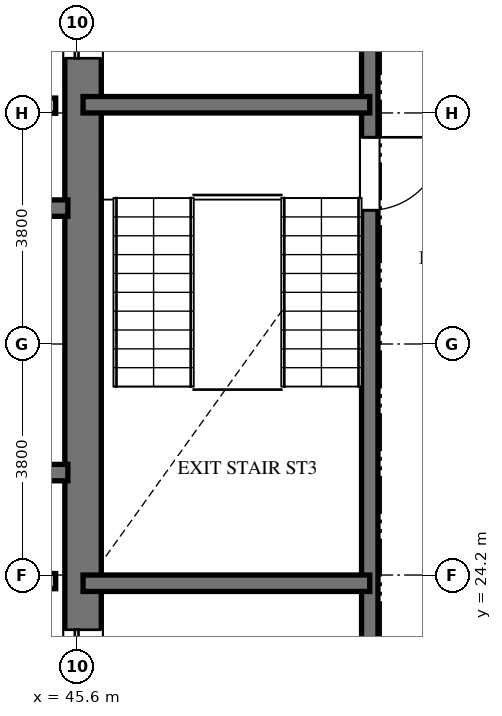
"""IFC4 building model, lengths in metres.
Left out: names, types, materials, properties, quantities, classifications, styles, units other than length and angle.
Written with IfcOpenShell. Run it as: python <this file> out.ifc"""

import sys

from ifc_helpers import new_model, si_unit, direction, frame, frame_2d, origin, place, context, subcontext, project, spatial, rectangle, extrude, element, fill, save


model = new_model("IFC4")
c1 = context("Model", 3, precision=1e-05, world=origin(), true_north=direction((0.0, 1.0)))
c2 = subcontext(c1, "Body", "Model", "MODEL_VIEW")
j1 = project(units=[si_unit("LENGTHUNIT", "METRE"), si_unit("PLANEANGLEUNIT", "RADIAN")], contexts=[c1])
p1 = place(None, origin())
s1 = spatial("IfcSite", under=j1, at=p1, CompositionType="ELEMENT")
p2 = place(p1, origin())
s2 = spatial("IfcBuilding", under=s1, at=p2, CompositionType="ELEMENT")
p3 = place(p2, frame((0.0, 0.0, 178.416)))
s3 = spatial("IfcBuildingStorey", under=s2, at=p3, CompositionType="ELEMENT", Elevation=178.416)
p4 = place(p3, frame((45.7, 20.95, 0.0), z_axis=(0.0, 0.0, 1.0), x_axis=(0.0, 1.0, 0.0)))
e1 = element("IfcWall", 1, at=p4, inside=s3, PredefinedType="SHEAR", context=c2, shape_type="SweptSolid", body=[
    extrude(rectangle(XDim=14.1, YDim=0.6, at=frame_2d((7.05, 0.0))), origin(), (0.0, 0.0, 1.0), 3.648),
])
p5 = place(p4, frame((11.75, 0.0, 0.0)))
e2 = element("IfcOpeningElement", 2, at=p5, cuts=e1, PredefinedType="OPENING", context=c2, shape_type="SweptSolid", body=[
    extrude(rectangle(XDim=1.4, YDim=2.3, at=frame_2d((0.7, 1.15))), frame((0.0, 0.31, 0.0), z_axis=(0.0, -1.0, 0.0), x_axis=(1.0, 0.0, 0.0)), (0.0, 0.0, 1.0), 0.62),
])
p6 = place(p4, frame((0.95, 0.0, 0.0)))
e3 = element("IfcOpeningElement", 3, at=p6, cuts=e1, PredefinedType="OPENING", context=c2, shape_type="SweptSolid", body=[
    extrude(rectangle(XDim=1.4, YDim=2.3, at=frame_2d((0.7, 1.15))), frame((0.0, 0.31, 0.0), z_axis=(0.0, -1.0, 0.0), x_axis=(1.0, 0.0, 0.0)), (0.0, 0.0, 1.0), 0.62),
])
p7 = place(p3, frame((37.465, 30.235, 0.0), z_axis=(0.0, 0.0, 1.0), x_axis=(1.0, 0.0, 0.0)))
e4 = element("IfcWall", 4, at=p7, inside=s3, PredefinedType="SHEAR", context=c2, shape_type="SweptSolid", body=[
    extrude(rectangle(XDim=7.985, YDim=0.27, at=frame_2d((3.992, 0.0))), origin(), (0.0, 0.0, 1.0), 3.648),
])
p8 = place(p7, frame((6.455, 0.0, 0.0)))
e5 = element("IfcOpeningElement", 5, at=p8, cuts=e4, PredefinedType="OPENING", context=c2, shape_type="SweptSolid", body=[
    extrude(rectangle(XDim=1.2, YDim=2.15, at=frame_2d((0.6, 1.075))), frame((0.0, 0.145, 0.0), z_axis=(0.0, -1.0, 0.0), x_axis=(1.0, 0.0, 0.0)), (0.0, 0.0, 1.0), 0.29),
])
p9 = place(p3, frame((37.465, 25.885, 0.0), z_axis=(0.0, 0.0, 1.0), x_axis=(1.0, 0.0, 0.0)))
e6 = element("IfcWall", 6, at=p9, inside=s3, PredefinedType="SHEAR", context=c2, shape_type="SweptSolid", body=[
    extrude(rectangle(XDim=7.985, YDim=0.27, at=frame_2d((3.992, 0.0))), origin(), (0.0, 0.0, 1.0), 3.648),
])
for number, where, z_axis, x_axis in (
    (7, (42.95, 31.92, 0.0), (0.0, 0.0, 1.0), (1.0, 0.0, 0.0)),
    (8, (42.95, 24.1, 0.0), (0.0, 0.0, 1.0), (1.0, 0.0, 0.0)),
):
    element("IfcWall", number, at=place(p3, frame(where, z_axis=z_axis, x_axis=x_axis)), inside=s3, PredefinedType="SOLIDWALL", context=c2, shape_type="SweptSolid", body=[
        extrude(rectangle(XDim=2.3, YDim=0.25, at=frame_2d((1.15, 0.0))), origin(), (0.0, 0.0, 1.0), 3.428),
    ])
p10 = place(p3, frame((50.415, 35.845, 0.0), z_axis=(0.0, 0.0, 1.0), x_axis=(0.0, -1.0, 0.0)))
e9 = element("IfcWall", 9, at=p10, inside=s3, PredefinedType="SHEAR", context=c2, shape_type="SweptSolid", body=[
    extrude(rectangle(XDim=15.825, YDim=0.27, at=frame_2d((7.913, 0.0))), origin(), (0.0, 0.0, 1.0), 3.648),
])
p11 = place(p10, frame((4.445, 0.0, 0.0)))
e10 = element("IfcOpeningElement", 10, at=p11, cuts=e9, PredefinedType="OPENING", context=c2, shape_type="SweptSolid", body=[
    extrude(rectangle(XDim=1.2, YDim=2.15, at=frame_2d((0.6, 1.075))), frame((0.0, 0.145, 0.0), z_axis=(0.0, -1.0, 0.0), x_axis=(1.0, 0.0, 0.0)), (0.0, 0.0, 1.0), 0.29),
])
p12 = place(p10, frame((1.295, 0.0, 0.0)))
e11 = element("IfcOpeningElement", 11, at=p12, cuts=e9, PredefinedType="OPENING", context=c2, shape_type="SweptSolid", body=[
    extrude(rectangle(XDim=1.3, YDim=2.2, at=frame_2d((0.65, 1.1))), frame((0.0, 0.145, 0.0), z_axis=(0.0, -1.0, 0.0), x_axis=(1.0, 0.0, 0.0)), (0.0, 0.0, 1.0), 0.29),
])
p13 = place(p10, frame((13.095, 0.0, 0.0)))
e12 = element("IfcOpeningElement", 12, at=p13, cuts=e9, PredefinedType="OPENING", context=c2, shape_type="SweptSolid", body=[
    extrude(rectangle(XDim=1.3, YDim=2.2, at=frame_2d((0.65, 1.1))), frame((0.0, 0.145, 0.0), z_axis=(0.0, -1.0, 0.0), x_axis=(1.0, 0.0, 0.0)), (0.0, 0.0, 1.0), 0.29),
])
for number, where, z_axis, x_axis in (
    (13, (45.7, 31.935, 0.0), (0.0, 0.0, 1.0), (1.0, 0.0, 0.0)),
    (14, (45.7, 24.065, 0.0), (0.0, 0.0, 1.0), (1.0, 0.0, 0.0)),
):
    element("IfcWall", number, at=place(p3, frame(where, z_axis=z_axis, x_axis=x_axis)), inside=s3, PredefinedType="SHEAR", context=c2, shape_type="SweptSolid", body=[
        extrude(rectangle(XDim=4.715, YDim=0.27, at=frame_2d((2.357, 0.0))), origin(), (0.0, 0.0, 1.0), 3.648),
    ])
p14 = place(p5, origin())
e15 = element("IfcDoor", 15, at=p14, inside=s3, OperationType="SLIDING_TO_LEFT", PredefinedType="DOOR", context=c2, shape_type="SweptSolid", body=[
    extrude(rectangle(XDim=1.4, YDim=2.3, at=frame_2d((0.7, 1.15))), frame((0.0, 0.025, 0.0), z_axis=(0.0, -1.0, 0.0), x_axis=(1.0, 0.0, 0.0)), (0.0, 0.0, 1.0), 0.05),
])
fill(e2, e15)
p15 = place(p6, origin())
e16 = element("IfcDoor", 16, at=p15, inside=s3, OperationType="SLIDING_TO_LEFT", PredefinedType="DOOR", context=c2, shape_type="SweptSolid", body=[
    extrude(rectangle(XDim=1.4, YDim=2.3, at=frame_2d((0.7, 1.15))), frame((0.0, 0.025, 0.0), z_axis=(0.0, -1.0, 0.0), x_axis=(1.0, 0.0, 0.0)), (0.0, 0.0, 1.0), 0.05),
])
fill(e3, e16)
p16 = place(p11, origin())
e17 = element("IfcDoor", 17, at=p16, inside=s3, OperationType="SINGLE_SWING_LEFT", PredefinedType="DOOR", context=c2, shape_type="SweptSolid", body=[
    extrude(rectangle(XDim=1.2, YDim=2.15, at=frame_2d((0.6, 1.075))), frame((0.0, 0.025, 0.0), z_axis=(0.0, -1.0, 0.0), x_axis=(1.0, 0.0, 0.0)), (0.0, 0.0, 1.0), 0.05),
])
fill(e10, e17)
save(model, sys.argv[1])
